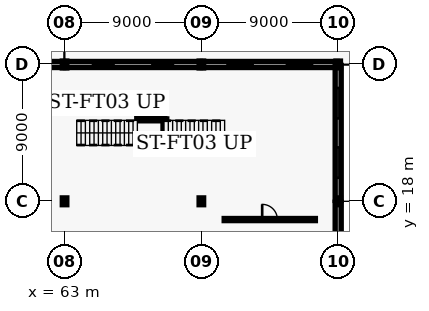
"""IFC4 building model, lengths in metres.
Left out: names, types, materials, properties, quantities, classifications, styles, units other than length and angle.
Written with IfcOpenShell. Run it as: python <this file> out.ifc"""

import sys

from ifc_helpers import new_model, si_unit, direction, frame, frame_2d, origin, origin_2d, place, context, subcontext, project, spatial, rectangle, i_section, extrude, element, fill, save


model = new_model("IFC4")
c1 = context("Model", 3, precision=1e-05, world=origin(), true_north=direction((0.0, 1.0)))
c2 = subcontext(c1, "Body", "Model", "MODEL_VIEW")
j1 = project(units=[si_unit("LENGTHUNIT", "METRE"), si_unit("PLANEANGLEUNIT", "RADIAN")], contexts=[c1])
p1 = place(None, origin())
s1 = spatial("IfcSite", under=j1, at=p1, CompositionType="ELEMENT")
p2 = place(p1, origin())
s2 = spatial("IfcBuilding", under=s1, at=p2, CompositionType="ELEMENT")
p3 = place(p2, origin())
s3 = spatial("IfcBuildingStorey", under=s2, at=p3, CompositionType="ELEMENT", Elevation=0.0)
for number, where, z_axis, x_axis in (
    (1, (63.0, 18.0, 0.0), (0.0, 0.0, 1.0), (1.0, 0.0, 0.0)),
    (2, (63.0, 27.0, 0.0), (0.0, 0.0, 1.0), (1.0, 0.0, 0.0)),
    (3, (72.0, 18.0, 0.0), (0.0, 0.0, 1.0), (1.0, 0.0, 0.0)),
    (4, (72.0, 27.0, 0.0), (0.0, 0.0, 1.0), (1.0, 0.0, 0.0)),
    (5, (81.0, 18.0, 0.0), (0.0, 0.0, 1.0), (1.0, 0.0, 0.0)),
    (6, (81.0, 27.0, 0.0), (0.0, 0.0, 1.0), (1.0, 0.0, 0.0)),
):
    element("IfcColumn", number, at=place(p3, frame(where, z_axis=z_axis, x_axis=x_axis)), inside=s3, PredefinedType="COLUMN", context=c2, shape_type="SweptSolid", body=[
        extrude(i_section(OverallWidth=0.3, OverallDepth=0.45, WebThickness=0.014, FlangeThickness=0.026, FilletRadius=0.027, at=origin_2d()), origin(), (0.0, 0.0, 1.0), 5.4),
    ])
p4 = place(p3, frame((54.06, 27.0, 0.0), z_axis=(0.0, 0.0, 1.0), x_axis=(1.0, 0.0, 0.0)))
e7 = element("IfcWall", 7, at=p4, inside=s3, PredefinedType="SOLIDWALL", context=c2, shape_type="SweptSolid", body=[
    extrude(rectangle(XDim=8.88, YDim=0.4, at=frame_2d((4.44, 0.0))), origin(), (0.0, 0.0, 1.0), 4.7),
])
p5 = place(p4, frame((3.34, 0.0, 0.0)))
e8 = element("IfcOpeningElement", 8, at=p5, cuts=e7, PredefinedType="OPENING", context=c2, shape_type="SweptSolid", body=[
    extrude(rectangle(XDim=2.2, YDim=2.4, at=frame_2d((1.1, 1.2))), frame((0.0, 0.21, 0.0), z_axis=(0.0, -1.0, 0.0), x_axis=(1.0, 0.0, 0.0)), (0.0, 0.0, 1.0), 0.42),
])
p6 = place(p3, frame((63.06, 27.0, 0.0), z_axis=(0.0, 0.0, 1.0), x_axis=(1.0, 0.0, 0.0)))
e9 = element("IfcWall", 9, at=p6, inside=s3, PredefinedType="SOLIDWALL", context=c2, shape_type="SweptSolid", body=[
    extrude(rectangle(XDim=8.88, YDim=0.4, at=frame_2d((4.44, 0.0))), origin(), (0.0, 0.0, 1.0), 4.7),
])
p7 = place(p6, frame((1.811, 0.0, 0.9)))
e10 = element("IfcOpeningElement", 10, at=p7, cuts=e9, PredefinedType="OPENING", context=c2, shape_type="SweptSolid", body=[
    extrude(rectangle(XDim=1.35, YDim=2.15, at=frame_2d((0.675, 1.075))), frame((0.0, 0.21, 0.0), z_axis=(0.0, -1.0, 0.0), x_axis=(1.0, 0.0, 0.0)), (0.0, 0.0, 1.0), 0.42),
])
p8 = place(p6, frame((5.719, 0.0, 0.9)))
e11 = element("IfcOpeningElement", 11, at=p8, cuts=e9, PredefinedType="OPENING", context=c2, shape_type="SweptSolid", body=[
    extrude(rectangle(XDim=1.35, YDim=2.15, at=frame_2d((0.675, 1.075))), frame((0.0, 0.21, 0.0), z_axis=(0.0, -1.0, 0.0), x_axis=(1.0, 0.0, 0.0)), (0.0, 0.0, 1.0), 0.42),
])
p9 = place(p3, frame((72.06, 27.0, 0.0), z_axis=(0.0, 0.0, 1.0), x_axis=(1.0, 0.0, 0.0)))
e12 = element("IfcWall", 12, at=p9, inside=s3, PredefinedType="SOLIDWALL", context=c2, shape_type="SweptSolid", body=[
    extrude(rectangle(XDim=8.88, YDim=0.4, at=frame_2d((4.44, 0.0))), origin(), (0.0, 0.0, 1.0), 4.7),
])
p10 = place(p9, frame((1.661, 0.0, 0.9)))
e13 = element("IfcOpeningElement", 13, at=p10, cuts=e12, PredefinedType="OPENING", context=c2, shape_type="SweptSolid", body=[
    extrude(rectangle(XDim=1.65, YDim=2.3, at=frame_2d((0.825, 1.15))), frame((0.0, 0.21, 0.0), z_axis=(0.0, -1.0, 0.0), x_axis=(1.0, 0.0, 0.0)), (0.0, 0.0, 1.0), 0.42),
])
p11 = place(p9, frame((5.569, 0.0, 0.9)))
e14 = element("IfcOpeningElement", 14, at=p11, cuts=e12, PredefinedType="OPENING", context=c2, shape_type="SweptSolid", body=[
    extrude(rectangle(XDim=1.65, YDim=2.3, at=frame_2d((0.825, 1.15))), frame((0.0, 0.21, 0.0), z_axis=(0.0, -1.0, 0.0), x_axis=(1.0, 0.0, 0.0)), (0.0, 0.0, 1.0), 0.42),
])
p12 = place(p3, frame((81.0, 9.06, 0.0), z_axis=(0.0, 0.0, 1.0), x_axis=(0.0, 1.0, 0.0)))
e15 = element("IfcWall", 15, at=p12, inside=s3, PredefinedType="SOLIDWALL", context=c2, shape_type="SweptSolid", body=[
    extrude(rectangle(XDim=8.88, YDim=0.4, at=frame_2d((4.44, 0.0))), origin(), (0.0, 0.0, 1.0), 4.7),
])
p13 = place(p12, frame((3.54, 0.0, 0.0)))
e16 = element("IfcOpeningElement", 16, at=p13, cuts=e15, PredefinedType="OPENING", context=c2, shape_type="SweptSolid", body=[
    extrude(rectangle(XDim=1.8, YDim=2.2, at=frame_2d((0.9, 1.1))), frame((0.0, 0.21, 0.0), z_axis=(0.0, -1.0, 0.0), x_axis=(1.0, 0.0, 0.0)), (0.0, 0.0, 1.0), 0.42),
])
p14 = place(p3, frame((81.0, 18.06, 0.0), z_axis=(0.0, 0.0, 1.0), x_axis=(0.0, 1.0, 0.0)))
e17 = element("IfcWall", 17, at=p14, inside=s3, PredefinedType="SOLIDWALL", context=c2, shape_type="SweptSolid", body=[
    extrude(rectangle(XDim=8.88, YDim=0.4, at=frame_2d((4.44, 0.0))), origin(), (0.0, 0.0, 1.0), 4.7),
])
p15 = place(p14, frame((1.486, 0.0, 0.9)))
e18 = element("IfcOpeningElement", 18, at=p15, cuts=e17, PredefinedType="OPENING", context=c2, shape_type="SweptSolid", body=[
    extrude(rectangle(XDim=2.0, YDim=2.4, at=frame_2d((1.0, 1.2))), frame((0.0, 0.21, 0.0), z_axis=(0.0, -1.0, 0.0), x_axis=(1.0, 0.0, 0.0)), (0.0, 0.0, 1.0), 0.42),
])
p16 = place(p14, frame((5.394, 0.0, 0.9)))
e19 = element("IfcOpeningElement", 19, at=p16, cuts=e17, PredefinedType="OPENING", context=c2, shape_type="SweptSolid", body=[
    extrude(rectangle(XDim=2.0, YDim=2.4, at=frame_2d((1.0, 1.2))), frame((0.0, 0.21, 0.0), z_axis=(0.0, -1.0, 0.0), x_axis=(1.0, 0.0, 0.0)), (0.0, 0.0, 1.0), 0.42),
])
for number, where, z_axis, x_axis in (
    (20, (67.75, 21.58, 0.0), (0.0, 0.0, 1.0), (1.0, 0.0, 0.0)),
    (21, (67.75, 23.42, 0.0), (0.0, 0.0, 1.0), (1.0, 0.0, 0.0)),
):
    element("IfcWall", number, at=place(p3, frame(where, z_axis=z_axis, x_axis=x_axis)), inside=s3, PredefinedType="SHEAR", context=c2, shape_type="SweptSolid", body=[
        extrude(rectangle(XDim=1.85, YDim=0.25, at=frame_2d((0.925, 0.0))), origin(), (0.0, 0.0, 1.0), 2.46),
    ])
p17 = place(p3, frame((69.6, 21.58, 0.0), z_axis=(0.0, 0.0, 1.0), x_axis=(0.0, 1.0, 0.0)))
e22 = element("IfcWall", 22, at=p17, inside=s3, PredefinedType="SHEAR", context=c2, shape_type="SweptSolid", body=[
    extrude(rectangle(XDim=1.84, YDim=0.25, at=frame_2d((0.92, 0.0))), origin(), (0.0, 0.0, 1.0), 2.46),
])
p18 = place(p3, frame((73.5, 16.8, 0.0), z_axis=(0.0, 0.0, 1.0), x_axis=(1.0, 0.0, 0.0)))
e23 = element("IfcWall", 23, at=p18, inside=s3, PredefinedType="PARTITIONING", context=c2, shape_type="SweptSolid", body=[
    extrude(rectangle(XDim=6.0, YDim=0.14, at=frame_2d((3.0, 0.0))), origin(), (0.0, 0.0, 1.0), 4.3),
])
p19 = place(p18, frame((2.5, 0.0, 0.0)))
e24 = element("IfcOpeningElement", 24, at=p19, cuts=e23, PredefinedType="OPENING", context=c2, shape_type="SweptSolid", body=[
    extrude(rectangle(XDim=1.0, YDim=2.1, at=frame_2d((0.5, 1.05))), frame((0.0, 0.08, 0.0), z_axis=(0.0, -1.0, 0.0), x_axis=(1.0, 0.0, 0.0)), (0.0, 0.0, 1.0), 0.16),
])
p20 = place(p7, origin())
e25 = element("IfcWindow", 25, at=p20, inside=s3, PartitioningType="SINGLE_PANEL", PredefinedType="WINDOW", context=c2, shape_type="SweptSolid", body=[
    extrude(rectangle(XDim=1.35, YDim=2.15, at=frame_2d((0.675, 1.075))), frame((0.0, 0.03, 0.0), z_axis=(0.0, -1.0, 0.0), x_axis=(1.0, 0.0, 0.0)), (0.0, 0.0, 1.0), 0.06),
])
fill(e10, e25)
p21 = place(p8, origin())
e26 = element("IfcWindow", 26, at=p21, inside=s3, PartitioningType="SINGLE_PANEL", PredefinedType="WINDOW", context=c2, shape_type="SweptSolid", body=[
    extrude(rectangle(XDim=1.35, YDim=2.15, at=frame_2d((0.675, 1.075))), frame((0.0, 0.03, 0.0), z_axis=(0.0, -1.0, 0.0), x_axis=(1.0, 0.0, 0.0)), (0.0, 0.0, 1.0), 0.06),
])
fill(e11, e26)
p22 = place(p10, origin())
e27 = element("IfcWindow", 27, at=p22, inside=s3, PartitioningType="SINGLE_PANEL", PredefinedType="WINDOW", context=c2, shape_type="SweptSolid", body=[
    extrude(rectangle(XDim=1.65, YDim=2.3, at=frame_2d((0.825, 1.15))), frame((0.0, 0.03, 0.0), z_axis=(0.0, -1.0, 0.0), x_axis=(1.0, 0.0, 0.0)), (0.0, 0.0, 1.0), 0.06),
])
fill(e13, e27)
p23 = place(p11, origin())
e28 = element("IfcWindow", 28, at=p23, inside=s3, PartitioningType="SINGLE_PANEL", PredefinedType="WINDOW", context=c2, shape_type="SweptSolid", body=[
    extrude(rectangle(XDim=1.65, YDim=2.3, at=frame_2d((0.825, 1.15))), frame((0.0, 0.03, 0.0), z_axis=(0.0, -1.0, 0.0), x_axis=(1.0, 0.0, 0.0)), (0.0, 0.0, 1.0), 0.06),
])
fill(e14, e28)
p24 = place(p15, origin())
e29 = element("IfcWindow", 29, at=p24, inside=s3, PartitioningType="SINGLE_PANEL", PredefinedType="WINDOW", context=c2, shape_type="SweptSolid", body=[
    extrude(rectangle(XDim=2.0, YDim=2.4, at=frame_2d((1.0, 1.2))), frame((0.0, 0.03, 0.0), z_axis=(0.0, -1.0, 0.0), x_axis=(1.0, 0.0, 0.0)), (0.0, 0.0, 1.0), 0.06),
])
fill(e18, e29)
p25 = place(p16, origin())
e30 = element("IfcWindow", 30, at=p25, inside=s3, PartitioningType="SINGLE_PANEL", PredefinedType="WINDOW", context=c2, shape_type="SweptSolid", body=[
    extrude(rectangle(XDim=2.0, YDim=2.4, at=frame_2d((1.0, 1.2))), frame((0.0, 0.03, 0.0), z_axis=(0.0, -1.0, 0.0), x_axis=(1.0, 0.0, 0.0)), (0.0, 0.0, 1.0), 0.06),
])
fill(e19, e30)
p26 = place(p19, origin())
e31 = element("IfcDoor", 31, at=p26, inside=s3, OperationType="SINGLE_SWING_LEFT", PredefinedType="DOOR", context=c2, shape_type="SweptSolid", body=[
    extrude(rectangle(XDim=1.0, YDim=2.1, at=frame_2d((0.5, 1.05))), frame((0.0, 0.025, 0.0), z_axis=(0.0, -1.0, 0.0), x_axis=(1.0, 0.0, 0.0)), (0.0, 0.0, 1.0), 0.05),
])
fill(e24, e31)
save(model, sys.argv[1])
